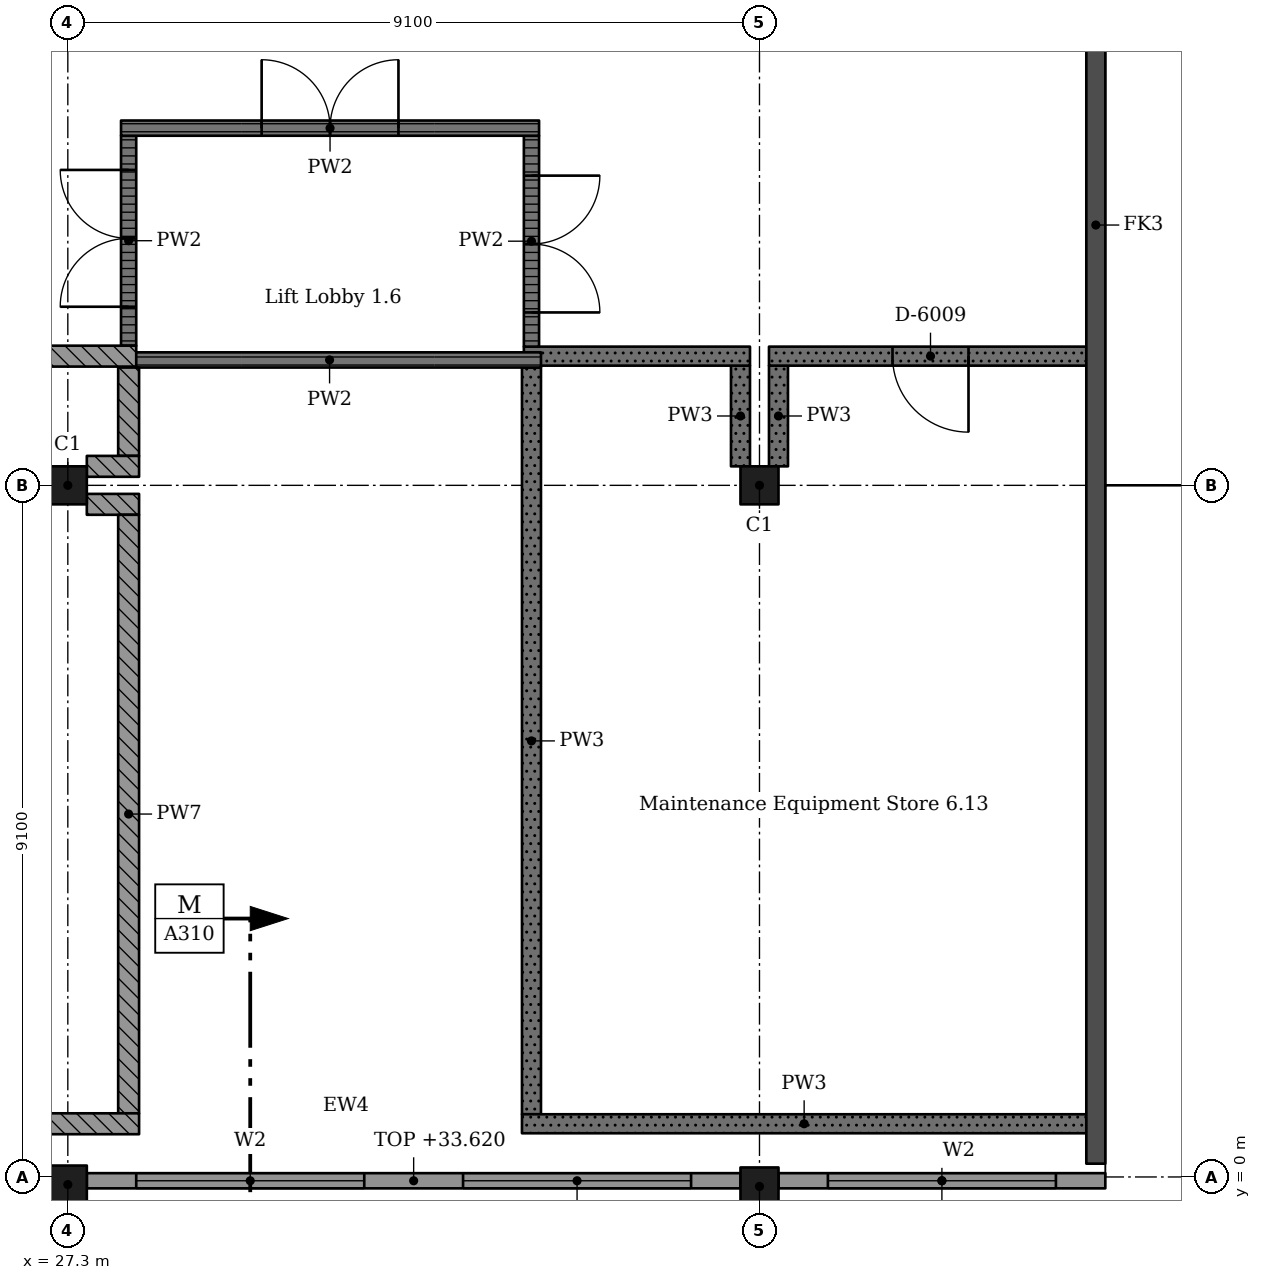
"""IFC4 building model, lengths in metres.
Left out: names, types, materials, properties, quantities, classifications, styles, units other than length and angle.
Written with IfcOpenShell. Run it as: python <this file> out.ifc"""

import sys

from ifc_helpers import new_model, si_unit, direction, frame, frame_2d, origin, origin_2d, place, context, subcontext, project, spatial, rectangle, extrude, element, fill, save


model = new_model("IFC4")
c1 = context("Model", 3, precision=1e-05, world=origin(), true_north=direction((0.0, 1.0)))
c2 = subcontext(c1, "Body", "Model", "MODEL_VIEW")
j1 = project(units=[si_unit("LENGTHUNIT", "METRE"), si_unit("PLANEANGLEUNIT", "RADIAN")], contexts=[c1])
p1 = place(None, origin())
s1 = spatial("IfcSite", under=j1, at=p1, CompositionType="ELEMENT")
p2 = place(p1, origin())
s2 = spatial("IfcBuilding", under=s1, at=p2, CompositionType="ELEMENT")
p3 = place(p2, frame((0.0, 0.0, 29.12)))
s3 = spatial("IfcBuildingStorey", under=s2, at=p3, CompositionType="ELEMENT", Elevation=29.12)
for number, where, z_axis, x_axis in (
    (1, (27.3, -0.1, 0.0), (0.0, 0.0, 1.0), (1.0, 0.0, 0.0)),
    (2, (27.3, 9.1, 0.0), (0.0, 0.0, 1.0), (1.0, 0.0, 0.0)),
    (3, (36.4, -0.125, 0.0), (0.0, 0.0, 1.0), (1.0, 0.0, 0.0)),
    (4, (36.4, 9.1, 0.0), (0.0, 0.0, 1.0), (1.0, 0.0, 0.0)),
):
    element("IfcColumn", number, at=place(p3, frame(where, z_axis=z_axis, x_axis=x_axis)), inside=s3, PredefinedType="COLUMN", context=c2, shape_type="SweptSolid", body=[
        extrude(rectangle(XDim=0.5, YDim=0.5, at=origin_2d()), origin(), (0.0, 0.0, 1.0), 4.55),
    ])
p4 = place(p3, frame((40.825, 40.95, 0.0), z_axis=(0.0, 0.0, 1.0), x_axis=(0.0, -1.0, 0.0)))
e5 = element("IfcWall", 5, at=p4, inside=s3, PredefinedType="SHEAR", context=c2, shape_type="SweptSolid", body=[
    extrude(rectangle(XDim=40.775, YDim=0.25, at=frame_2d((20.387, 0.0))), origin(), (0.0, 0.0, 1.0), 4.55),
])
p5 = place(p3, frame((27.55, -0.05, 0.0), z_axis=(0.0, 0.0, 1.0), x_axis=(1.0, 0.0, 0.0)))
e6 = element("IfcWall", 6, at=p5, inside=s3, PredefinedType="SOLIDWALL", context=c2, shape_type="SweptSolid", body=[
    extrude(rectangle(XDim=8.6, YDim=0.2, at=frame_2d((4.3, 0.0))), origin(), (0.0, 0.0, 1.0), 4.5),
])
p6 = place(p5, frame((0.65, 0.0, 0.6)))
e7 = element("IfcOpeningElement", 7, at=p6, cuts=e6, PredefinedType="OPENING", context=c2, shape_type="SweptSolid", body=[
    extrude(rectangle(XDim=3.0, YDim=3.0, at=frame_2d((1.5, 1.5))), frame((0.0, 0.11, 0.0), z_axis=(0.0, -1.0, 0.0), x_axis=(1.0, 0.0, 0.0)), (0.0, 0.0, 1.0), 0.22),
])
p7 = place(p5, frame((4.95, 0.0, 0.6)))
e8 = element("IfcOpeningElement", 8, at=p7, cuts=e6, PredefinedType="OPENING", context=c2, shape_type="SweptSolid", body=[
    extrude(rectangle(XDim=3.0, YDim=3.0, at=frame_2d((1.5, 1.5))), frame((0.0, 0.11, 0.0), z_axis=(0.0, -1.0, 0.0), x_axis=(1.0, 0.0, 0.0)), (0.0, 0.0, 1.0), 0.22),
])
p8 = place(p3, frame((36.65, -0.05, 0.0), z_axis=(0.0, 0.0, 1.0), x_axis=(1.0, 0.0, 0.0)))
e9 = element("IfcWall", 9, at=p8, inside=s3, PredefinedType="SOLIDWALL", context=c2, shape_type="SweptSolid", body=[
    extrude(rectangle(XDim=4.3, YDim=0.2, at=frame_2d((2.15, 0.0))), origin(), (0.0, 0.0, 1.0), 4.5),
])
p9 = place(p8, frame((0.65, 0.0, 0.6)))
e10 = element("IfcOpeningElement", 10, at=p9, cuts=e9, PredefinedType="OPENING", context=c2, shape_type="SweptSolid", body=[
    extrude(rectangle(XDim=3.0, YDim=3.0, at=frame_2d((1.5, 1.5))), frame((0.0, 0.11, 0.0), z_axis=(0.0, -1.0, 0.0), x_axis=(1.0, 0.0, 0.0)), (0.0, 0.0, 1.0), 0.22),
])
p10 = place(p3, frame((27.55, 8.85, 0.0), z_axis=(0.0, 0.0, 1.0), x_axis=(1.0, 0.0, 0.0)))
e11 = element("IfcWall", 11, at=p10, inside=s3, PredefinedType="SOLIDWALL", context=c2, shape_type="SweptSolid", body=[
    extrude(rectangle(XDim=0.688, YDim=0.275, at=frame_2d((0.344, 0.0))), origin(), (0.0, 0.0, 1.0), 3.88),
])
p11 = place(p3, frame((28.1, 8.712, 0.0), z_axis=(0.0, 0.0, 1.0), x_axis=(0.0, -1.0, 0.0)))
e12 = element("IfcWall", 12, at=p11, inside=s3, PredefinedType="SOLIDWALL", context=c2, shape_type="SweptSolid", body=[
    extrude(rectangle(XDim=7.875, YDim=0.275, at=frame_2d((3.938, 0.0))), origin(), (0.0, 0.0, 1.0), 3.88),
])
p12 = place(p3, frame((28.1, 10.65, 0.0), z_axis=(0.0, 0.0, 1.0), x_axis=(0.0, -1.0, 0.0)))
e13 = element("IfcWall", 13, at=p12, inside=s3, PredefinedType="SOLIDWALL", context=c2, shape_type="SweptSolid", body=[
    extrude(rectangle(XDim=1.162, YDim=0.275, at=frame_2d((0.581, 0.0))), origin(), (0.0, 0.0, 1.0), 3.88),
])
p13 = place(p3, frame((28.1, 13.7, 0.0), z_axis=(0.0, 0.0, 1.0), x_axis=(0.0, -1.0, 0.0)))
e14 = element("IfcWall", 14, at=p13, inside=s3, PredefinedType="PARTITIONING", context=c2, shape_type="SweptSolid", body=[
    extrude(rectangle(XDim=2.762, YDim=0.2, at=frame_2d((1.381, 0.0))), origin(), (0.0, 0.0, 1.0), 3.88),
])
p14 = place(p13, frame((0.45, 0.0, 0.0)))
e15 = element("IfcOpeningElement", 15, at=p14, cuts=e14, PredefinedType="OPENING", context=c2, shape_type="SweptSolid", body=[
    extrude(rectangle(XDim=1.8, YDim=2.4, at=frame_2d((0.9, 1.2))), frame((0.0, 0.11, 0.0), z_axis=(0.0, -1.0, 0.0), x_axis=(1.0, 0.0, 0.0)), (0.0, 0.0, 1.0), 0.22),
])
p15 = place(p3, frame((28.2, 10.8, 0.0), z_axis=(0.0, 0.0, 1.0), x_axis=(-1.0, 0.0, 0.0)))
e16 = element("IfcWall", 16, at=p15, inside=s3, PredefinedType="SOLIDWALL", context=c2, shape_type="SweptSolid", body=[
    extrude(rectangle(XDim=3.87, YDim=0.275, at=frame_2d((1.935, 0.0))), origin(), (0.0, 0.0, 1.0), 3.88),
])
p16 = place(p15, frame((1.35, 0.0, 0.0)))
e17 = element("IfcOpeningElement", 17, at=p16, cuts=e16, PredefinedType="OPENING", context=c2, shape_type="SweptSolid", body=[
    extrude(rectangle(XDim=1.2, YDim=2.4, at=frame_2d((0.6, 1.2))), frame((0.0, 0.147, 0.0), z_axis=(0.0, -1.0, 0.0), x_axis=(1.0, 0.0, 0.0)), (0.0, 0.0, 1.0), 0.295),
])
p17 = place(p3, frame((28.238, 0.7, 0.0), z_axis=(0.0, 0.0, 1.0), x_axis=(-1.0, 0.0, 0.0)))
e18 = element("IfcWall", 18, at=p17, inside=s3, PredefinedType="SOLIDWALL", context=c2, shape_type="SweptSolid", body=[
    extrude(rectangle(XDim=3.907, YDim=0.275, at=frame_2d((1.954, 0.0))), origin(), (0.0, 0.0, 1.0), 3.88),
])
p18 = place(p3, frame((28.238, 9.35, 0.0), z_axis=(0.0, 0.0, 1.0), x_axis=(-1.0, 0.0, 0.0)))
e19 = element("IfcWall", 19, at=p18, inside=s3, PredefinedType="SOLIDWALL", context=c2, shape_type="SweptSolid", body=[
    extrude(rectangle(XDim=0.688, YDim=0.275, at=frame_2d((0.344, 0.0))), origin(), (0.0, 0.0, 1.0), 3.88),
])
p19 = place(p3, frame((33.4, 0.825, 0.0), z_axis=(0.0, 0.0, 1.0), x_axis=(0.0, 1.0, 0.0)))
e20 = element("IfcWall", 20, at=p19, inside=s3, PredefinedType="SOLIDWALL", context=c2, shape_type="SweptSolid", body=[
    extrude(rectangle(XDim=9.825, YDim=0.25, at=frame_2d((4.913, 0.0))), origin(), (0.0, 0.0, 1.0), 3.88),
])
p20 = place(p3, frame((33.4, 10.925, 0.0), z_axis=(0.0, 0.0, 1.0), x_axis=(0.0, 1.0, 0.0)))
e21 = element("IfcWall", 21, at=p20, inside=s3, PredefinedType="PARTITIONING", context=c2, shape_type="SweptSolid", body=[
    extrude(rectangle(XDim=2.775, YDim=0.2, at=frame_2d((1.387, 0.0))), origin(), (0.0, 0.0, 1.0), 3.88),
])
p21 = place(p20, frame((0.45, 0.0, 0.0)))
e22 = element("IfcOpeningElement", 22, at=p21, cuts=e21, PredefinedType="OPENING", context=c2, shape_type="SweptSolid", body=[
    extrude(rectangle(XDim=1.8, YDim=2.4, at=frame_2d((0.9, 1.2))), frame((0.0, 0.11, 0.0), z_axis=(0.0, -1.0, 0.0), x_axis=(1.0, 0.0, 0.0)), (0.0, 0.0, 1.0), 0.22),
])
p22 = place(p3, frame((33.5, 13.8, 0.0), z_axis=(0.0, 0.0, 1.0), x_axis=(-1.0, 0.0, 0.0)))
e23 = element("IfcWall", 23, at=p22, inside=s3, PredefinedType="PARTITIONING", context=c2, shape_type="SweptSolid", body=[
    extrude(rectangle(XDim=5.5, YDim=0.2, at=frame_2d((2.75, 0.0))), origin(), (0.0, 0.0, 1.0), 3.88),
])
p23 = place(p22, frame((1.85, 0.0, 0.0)))
e24 = element("IfcOpeningElement", 24, at=p23, cuts=e23, PredefinedType="OPENING", context=c2, shape_type="SweptSolid", body=[
    extrude(rectangle(XDim=1.8, YDim=2.4, at=frame_2d((0.9, 1.2))), frame((0.0, 0.11, 0.0), z_axis=(0.0, -1.0, 0.0), x_axis=(1.0, 0.0, 0.0)), (0.0, 0.0, 1.0), 0.22),
])
p24 = place(p3, frame((33.525, 10.75, 0.0), z_axis=(0.0, 0.0, 1.0), x_axis=(-1.0, 0.0, 0.0)))
e25 = element("IfcWall", 25, at=p24, inside=s3, PredefinedType="PARTITIONING", context=c2, shape_type="SweptSolid", body=[
    extrude(rectangle(XDim=5.562, YDim=0.2, at=frame_2d((2.781, 0.0))), origin(), (0.0, 0.0, 1.0), 3.88),
])
p25 = place(p3, frame((36.15, 9.35, 0.0), z_axis=(0.0, 0.0, 1.0), x_axis=(0.0, 1.0, 0.0)))
e26 = element("IfcWall", 26, at=p25, inside=s3, PredefinedType="SOLIDWALL", context=c2, shape_type="SweptSolid", body=[
    extrude(rectangle(XDim=1.325, YDim=0.25, at=frame_2d((0.663, 0.0))), origin(), (0.0, 0.0, 1.0), 3.88),
])
p26 = place(p3, frame((36.275, 10.8, 0.0), z_axis=(0.0, 0.0, 1.0), x_axis=(-1.0, 0.0, 0.0)))
e27 = element("IfcWall", 27, at=p26, inside=s3, PredefinedType="SOLIDWALL", context=c2, shape_type="SweptSolid", body=[
    extrude(rectangle(XDim=2.975, YDim=0.25, at=frame_2d((1.487, 0.0))), origin(), (0.0, 0.0, 1.0), 3.88),
])
p27 = place(p3, frame((36.65, 10.675, 0.0), z_axis=(0.0, 0.0, 1.0), x_axis=(0.0, -1.0, 0.0)))
e28 = element("IfcWall", 28, at=p27, inside=s3, PredefinedType="SOLIDWALL", context=c2, shape_type="SweptSolid", body=[
    extrude(rectangle(XDim=1.325, YDim=0.25, at=frame_2d((0.663, 0.0))), origin(), (0.0, 0.0, 1.0), 3.88),
])
p28 = place(p3, frame((40.7, 0.7, 0.0), z_axis=(0.0, 0.0, 1.0), x_axis=(-1.0, 0.0, 0.0)))
e29 = element("IfcWall", 29, at=p28, inside=s3, PredefinedType="SOLIDWALL", context=c2, shape_type="SweptSolid", body=[
    extrude(rectangle(XDim=7.425, YDim=0.25, at=frame_2d((3.712, 0.0))), origin(), (0.0, 0.0, 1.0), 3.88),
])
p29 = place(p3, frame((40.7, 10.8, 0.0), z_axis=(0.0, 0.0, 1.0), x_axis=(-1.0, 0.0, 0.0)))
e30 = element("IfcWall", 30, at=p29, inside=s3, PredefinedType="SOLIDWALL", context=c2, shape_type="SweptSolid", body=[
    extrude(rectangle(XDim=4.175, YDim=0.25, at=frame_2d((2.087, 0.0))), origin(), (0.0, 0.0, 1.0), 3.88),
])
p30 = place(p29, frame((1.55, 0.0, 0.0)))
e31 = element("IfcOpeningElement", 31, at=p30, cuts=e30, PredefinedType="OPENING", context=c2, shape_type="SweptSolid", body=[
    extrude(rectangle(XDim=1.0, YDim=2.1, at=frame_2d((0.5, 1.05))), frame((0.0, 0.135, 0.0), z_axis=(0.0, -1.0, 0.0), x_axis=(1.0, 0.0, 0.0)), (0.0, 0.0, 1.0), 0.27),
])
p31 = place(p6, origin())
e32 = element("IfcWindow", 32, at=p31, inside=s3, PartitioningType="SINGLE_PANEL", PredefinedType="WINDOW", context=c2, shape_type="SweptSolid", body=[
    extrude(rectangle(XDim=3.0, YDim=3.0, at=frame_2d((1.5, 1.5))), frame((0.0, 0.03, 0.0), z_axis=(0.0, -1.0, 0.0), x_axis=(1.0, 0.0, 0.0)), (0.0, 0.0, 1.0), 0.06),
])
fill(e7, e32)
p32 = place(p7, origin())
e33 = element("IfcWindow", 33, at=p32, inside=s3, PartitioningType="SINGLE_PANEL", PredefinedType="WINDOW", context=c2, shape_type="SweptSolid", body=[
    extrude(rectangle(XDim=3.0, YDim=3.0, at=frame_2d((1.5, 1.5))), frame((0.0, 0.03, 0.0), z_axis=(0.0, -1.0, 0.0), x_axis=(1.0, 0.0, 0.0)), (0.0, 0.0, 1.0), 0.06),
])
fill(e8, e33)
p33 = place(p9, origin())
e34 = element("IfcWindow", 34, at=p33, inside=s3, PartitioningType="SINGLE_PANEL", PredefinedType="WINDOW", context=c2, shape_type="SweptSolid", body=[
    extrude(rectangle(XDim=3.0, YDim=3.0, at=frame_2d((1.5, 1.5))), frame((0.0, 0.03, 0.0), z_axis=(0.0, -1.0, 0.0), x_axis=(1.0, 0.0, 0.0)), (0.0, 0.0, 1.0), 0.06),
])
fill(e10, e34)
p34 = place(p30, origin())
e35 = element("IfcDoor", 35, at=p34, inside=s3, OperationType="SINGLE_SWING_RIGHT", PredefinedType="DOOR", context=c2, shape_type="SweptSolid", body=[
    extrude(rectangle(XDim=1.0, YDim=2.1, at=frame_2d((0.5, 1.05))), frame((0.0, 0.025, 0.0), z_axis=(0.0, -1.0, 0.0), x_axis=(1.0, 0.0, 0.0)), (0.0, 0.0, 1.0), 0.05),
])
fill(e31, e35)
p35 = place(p23, origin())
e36 = element("IfcDoor", 36, at=p35, inside=s3, OperationType="DOUBLE_DOOR_SINGLE_SWING", PredefinedType="DOOR", context=c2, shape_type="SweptSolid", body=[
    extrude(rectangle(XDim=1.8, YDim=2.4, at=frame_2d((0.9, 1.2))), frame((0.0, 0.025, 0.0), z_axis=(0.0, -1.0, 0.0), x_axis=(1.0, 0.0, 0.0)), (0.0, 0.0, 1.0), 0.05),
])
fill(e24, e36)
p36 = place(p21, origin())
e37 = element("IfcDoor", 37, at=p36, inside=s3, OperationType="DOUBLE_DOOR_SINGLE_SWING", PredefinedType="DOOR", context=c2, shape_type="SweptSolid", body=[
    extrude(rectangle(XDim=1.8, YDim=2.4, at=frame_2d((0.9, 1.2))), frame((0.0, 0.025, 0.0), z_axis=(0.0, -1.0, 0.0), x_axis=(1.0, 0.0, 0.0)), (0.0, 0.0, 1.0), 0.05),
])
fill(e22, e37)
p37 = place(p14, origin())
e38 = element("IfcDoor", 38, at=p37, inside=s3, OperationType="DOUBLE_DOOR_SINGLE_SWING", PredefinedType="DOOR", context=c2, shape_type="SweptSolid", body=[
    extrude(rectangle(XDim=1.8, YDim=2.4, at=frame_2d((0.9, 1.2))), frame((0.0, 0.025, 0.0), z_axis=(0.0, -1.0, 0.0), x_axis=(1.0, 0.0, 0.0)), (0.0, 0.0, 1.0), 0.05),
])
fill(e15, e38)
save(model, sys.argv[1])
